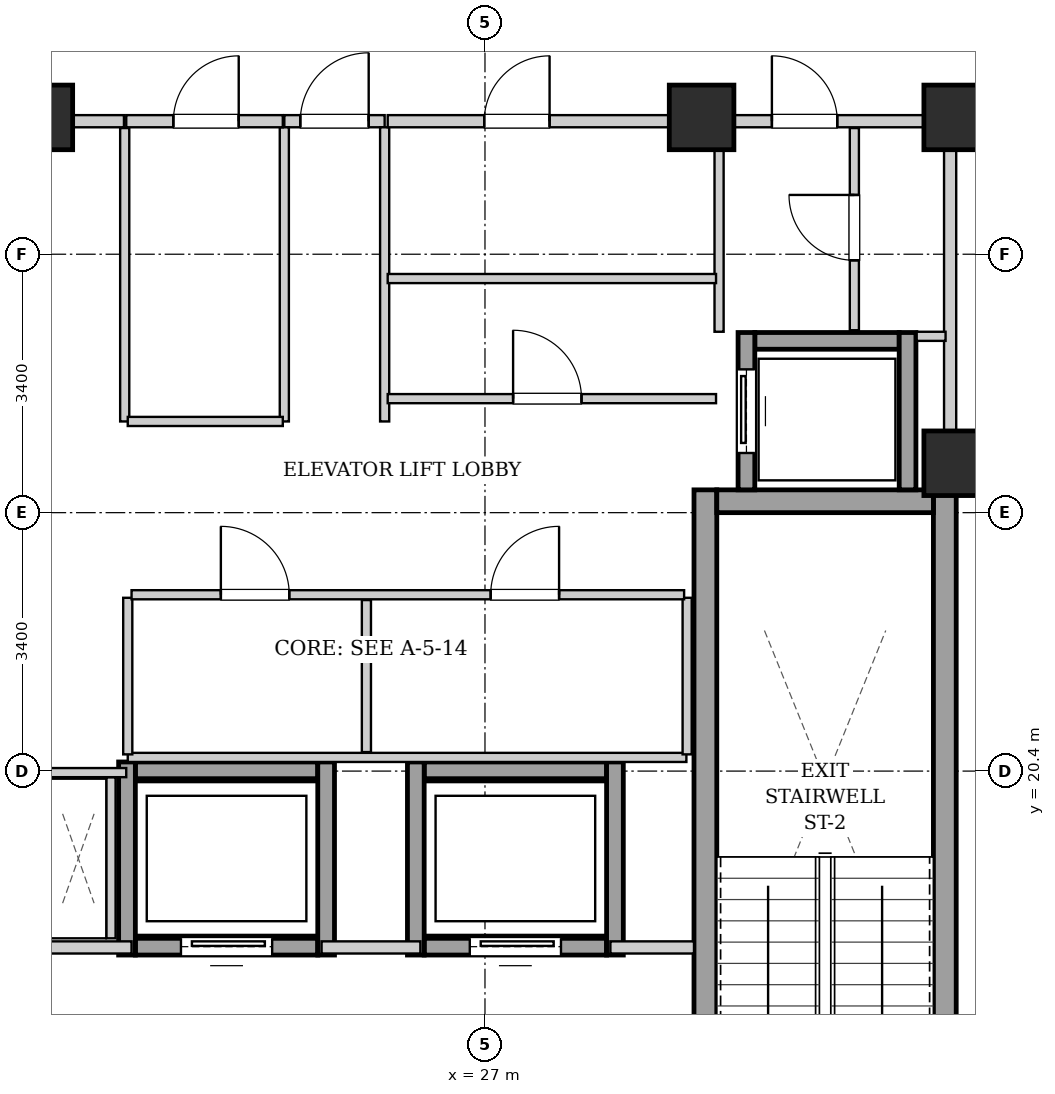
"""IFC4 building model, lengths in metres.
Left out: names, types, materials, properties, quantities, classifications, styles, units other than length and angle.
Written with IfcOpenShell. Run it as: python <this file> out.ifc"""

import sys

from ifc_helpers import new_model, si_unit, direction, frame, frame_2d, origin, origin_2d, place, context, subcontext, project, spatial, rectangle, extrude, element, fill, save


model = new_model("IFC4")
c1 = context("Model", 3, precision=1e-05, world=origin(), true_north=direction((0.0, 1.0)))
c2 = subcontext(c1, "Body", "Model", "MODEL_VIEW")
j1 = project(units=[si_unit("LENGTHUNIT", "METRE"), si_unit("PLANEANGLEUNIT", "RADIAN")], contexts=[c1])
p1 = place(None, origin())
s1 = spatial("IfcSite", under=j1, at=p1, CompositionType="ELEMENT")
p2 = place(p1, origin())
s2 = spatial("IfcBuilding", under=s1, at=p2, CompositionType="ELEMENT")
p3 = place(p2, frame((0.0, 0.0, 194.2)))
s3 = spatial("IfcBuildingStorey", under=s2, at=p3, CompositionType="ELEMENT", Elevation=194.2)
for number, where, z_axis, x_axis in (
    (1, (21.15, 29.0, 0.0), (0.0, 0.0, 1.0), (1.0, 0.0, 0.0)),
    (2, (29.85, 29.0, 0.0), (0.0, 0.0, 1.0), (1.0, 0.0, 0.0)),
    (3, (33.2, 29.0, 0.0), (0.0, 0.0, 1.0), (1.0, 0.0, 0.0)),
    (4, (33.2, 24.45, 0.0), (0.0, 0.0, 1.0), (1.0, 0.0, 0.0)),
):
    element("IfcColumn", number, at=place(p3, frame(where, z_axis=z_axis, x_axis=x_axis)), inside=s3, PredefinedType="COLUMN", context=c2, shape_type="SweptSolid", body=[
        extrude(rectangle(XDim=0.85, YDim=0.85, at=origin_2d()), origin(), (0.0, 0.0, 1.0), 3.3),
    ])
for number, where, z_axis, x_axis in (
    (5, (29.9, 15.1, 0.0), (0.0, 0.0, 1.0), (0.0, 1.0, 0.0)),
    (6, (33.05, 15.1, 0.0), (0.0, 0.0, 1.0), (0.0, 1.0, 0.0)),
):
    element("IfcWall", number, at=place(p3, frame(where, z_axis=z_axis, x_axis=x_axis)), inside=s3, PredefinedType="SHEAR", context=c2, shape_type="SweptSolid", body=[
        extrude(rectangle(XDim=9.0, YDim=0.3, at=frame_2d((4.5, 0.0))), origin(), (0.0, 0.0, 1.0), 3.04),
    ])
p4 = place(p3, frame((30.05, 23.95, 0.0), z_axis=(0.0, 0.0, 1.0), x_axis=(1.0, 0.0, 0.0)))
e7 = element("IfcWall", 7, at=p4, inside=s3, PredefinedType="SHEAR", context=c2, shape_type="SweptSolid", body=[
    extrude(rectangle(XDim=2.85, YDim=0.3, at=frame_2d((1.425, 0.0))), origin(), (0.0, 0.0, 1.0), 3.04),
])
p5 = place(p3, frame((30.55, 26.06, 0.0), z_axis=(0.0, 0.0, 1.0), x_axis=(1.0, 0.0, 0.0)))
e8 = element("IfcWall", 8, at=p5, inside=s3, PredefinedType="SHEAR", context=c2, shape_type="SweptSolid", body=[
    extrude(rectangle(XDim=1.9, YDim=0.22, at=frame_2d((0.95, 0.0))), origin(), (0.0, 0.0, 1.0), 3.04),
])
p6 = place(p3, frame((30.44, 24.1, 0.0), z_axis=(0.0, 0.0, 1.0), x_axis=(0.0, 1.0, 0.0)))
e9 = element("IfcWall", 9, at=p6, inside=s3, PredefinedType="SHEAR", context=c2, shape_type="SweptSolid", body=[
    extrude(rectangle(XDim=2.07, YDim=0.22, at=frame_2d((1.035, 0.0))), origin(), (0.0, 0.0, 1.0), 3.04),
])
p7 = place(p6, frame((0.485, 0.0, 0.0)))
e10 = element("IfcOpeningElement", 10, at=p7, cuts=e9, PredefinedType="OPENING", context=c2, shape_type="SweptSolid", body=[
    extrude(rectangle(XDim=1.1, YDim=2.15, at=frame_2d((0.55, 1.075))), frame((0.0, 0.12, 0.0), z_axis=(0.0, -1.0, 0.0), x_axis=(1.0, 0.0, 0.0)), (0.0, 0.0, 1.0), 0.24),
])
p8 = place(p3, frame((32.56, 24.1, 0.0), z_axis=(0.0, 0.0, 1.0), x_axis=(0.0, 1.0, 0.0)))
e11 = element("IfcWall", 11, at=p8, inside=s3, PredefinedType="SHEAR", context=c2, shape_type="SweptSolid", body=[
    extrude(rectangle(XDim=2.07, YDim=0.22, at=frame_2d((1.035, 0.0))), origin(), (0.0, 0.0, 1.0), 3.04),
])
p9 = place(p3, frame((22.4, 18.09, 0.0), z_axis=(0.0, 0.0, 1.0), x_axis=(1.0, 0.0, 0.0)))
e12 = element("IfcWall", 12, at=p9, inside=s3, PredefinedType="SHEAR", context=c2, shape_type="SweptSolid", body=[
    extrude(rectangle(XDim=2.4, YDim=0.22, at=frame_2d((1.2, 0.0))), origin(), (0.0, 0.0, 1.0), 3.04),
])
p10 = place(p9, frame((0.6, 0.0, 0.0)))
e13 = element("IfcOpeningElement", 13, at=p10, cuts=e12, PredefinedType="OPENING", context=c2, shape_type="SweptSolid", body=[
    extrude(rectangle(XDim=1.2, YDim=2.15, at=frame_2d((0.6, 1.075))), frame((0.0, 0.12, 0.0), z_axis=(0.0, -1.0, 0.0), x_axis=(1.0, 0.0, 0.0)), (0.0, 0.0, 1.0), 0.24),
])
p11 = place(p3, frame((22.4, 20.41, 0.0), z_axis=(0.0, 0.0, 1.0), x_axis=(1.0, 0.0, 0.0)))
e14 = element("IfcWall", 14, at=p11, inside=s3, PredefinedType="SHEAR", context=c2, shape_type="SweptSolid", body=[
    extrude(rectangle(XDim=2.4, YDim=0.22, at=frame_2d((1.2, 0.0))), origin(), (0.0, 0.0, 1.0), 3.04),
])
for number, where, z_axis, x_axis in (
    (15, (22.29, 17.98, 0.0), (0.0, 0.0, 1.0), (0.0, 1.0, 0.0)),
    (16, (24.91, 17.98, 0.0), (0.0, 0.0, 1.0), (0.0, 1.0, 0.0)),
):
    element("IfcWall", number, at=place(p3, frame(where, z_axis=z_axis, x_axis=x_axis)), inside=s3, PredefinedType="SHEAR", context=c2, shape_type="SweptSolid", body=[
        extrude(rectangle(XDim=2.54, YDim=0.22, at=frame_2d((1.27, 0.0))), origin(), (0.0, 0.0, 1.0), 3.04),
    ])
p12 = place(p3, frame((26.2, 18.09, 0.0), z_axis=(0.0, 0.0, 1.0), x_axis=(1.0, 0.0, 0.0)))
e17 = element("IfcWall", 17, at=p12, inside=s3, PredefinedType="SHEAR", context=c2, shape_type="SweptSolid", body=[
    extrude(rectangle(XDim=2.4, YDim=0.22, at=frame_2d((1.2, 0.0))), origin(), (0.0, 0.0, 1.0), 3.04),
])
p13 = place(p12, frame((0.6, 0.0, 0.0)))
e18 = element("IfcOpeningElement", 18, at=p13, cuts=e17, PredefinedType="OPENING", context=c2, shape_type="SweptSolid", body=[
    extrude(rectangle(XDim=1.2, YDim=2.15, at=frame_2d((0.6, 1.075))), frame((0.0, 0.12, 0.0), z_axis=(0.0, -1.0, 0.0), x_axis=(1.0, 0.0, 0.0)), (0.0, 0.0, 1.0), 0.24),
])
p14 = place(p3, frame((26.2, 20.41, 0.0), z_axis=(0.0, 0.0, 1.0), x_axis=(1.0, 0.0, 0.0)))
e19 = element("IfcWall", 19, at=p14, inside=s3, PredefinedType="SHEAR", context=c2, shape_type="SweptSolid", body=[
    extrude(rectangle(XDim=2.4, YDim=0.22, at=frame_2d((1.2, 0.0))), origin(), (0.0, 0.0, 1.0), 3.04),
])
for number, where, z_axis, x_axis in (
    (20, (26.09, 17.98, 0.0), (0.0, 0.0, 1.0), (0.0, 1.0, 0.0)),
    (21, (28.71, 17.98, 0.0), (0.0, 0.0, 1.0), (0.0, 1.0, 0.0)),
):
    element("IfcWall", number, at=place(p3, frame(where, z_axis=z_axis, x_axis=x_axis)), inside=s3, PredefinedType="SHEAR", context=c2, shape_type="SweptSolid", body=[
        extrude(rectangle(XDim=2.54, YDim=0.22, at=frame_2d((1.27, 0.0))), origin(), (0.0, 0.0, 1.0), 3.04),
    ])
p15 = place(p3, frame((21.25, 18.08, 0.0), z_axis=(0.0, 0.0, 1.0), x_axis=(1.0, 0.0, 0.0)))
e22 = element("IfcWall", 22, at=p15, inside=s3, PredefinedType="PARTITIONING", context=c2, shape_type="SweptSolid", body=[
    extrude(rectangle(XDim=1.1, YDim=0.16, at=frame_2d((0.55, 0.0))), origin(), (0.0, 0.0, 1.0), 3.04),
])
p16 = place(p3, frame((24.85, 18.08, 0.0), z_axis=(0.0, 0.0, 1.0), x_axis=(1.0, 0.0, 0.0)))
e23 = element("IfcWall", 23, at=p16, inside=s3, PredefinedType="PARTITIONING", context=c2, shape_type="SweptSolid", body=[
    extrude(rectangle(XDim=1.3, YDim=0.16, at=frame_2d((0.65, 0.0))), origin(), (0.0, 0.0, 1.0), 3.04),
])
p17 = place(p3, frame((28.65, 18.08, 0.0), z_axis=(0.0, 0.0, 1.0), x_axis=(1.0, 0.0, 0.0)))
e24 = element("IfcWall", 24, at=p17, inside=s3, PredefinedType="PARTITIONING", context=c2, shape_type="SweptSolid", body=[
    extrude(rectangle(XDim=1.1, YDim=0.16, at=frame_2d((0.55, 0.0))), origin(), (0.0, 0.0, 1.0), 3.04),
])
p18 = place(p3, frame((33.12, 24.12, 0.0), z_axis=(0.0, 0.0, 1.0), x_axis=(0.0, 1.0, 0.0)))
e25 = element("IfcWall", 25, at=p18, inside=s3, PredefinedType="PARTITIONING", context=c2, shape_type="SweptSolid", body=[
    extrude(rectangle(XDim=4.76, YDim=0.16, at=frame_2d((2.38, 0.0))), origin(), (0.0, 0.0, 1.0), 3.04),
])
p19 = place(p3, frame((24.36, 28.95, 0.0), z_axis=(0.0, 0.0, 1.0), x_axis=(1.0, 0.0, 0.0)))
e26 = element("IfcWall", 26, at=p19, inside=s3, PredefinedType="PARTITIONING", context=c2, shape_type="SweptSolid", body=[
    extrude(rectangle(XDim=1.32, YDim=0.16, at=frame_2d((0.66, 0.0))), origin(), (0.0, 0.0, 1.0), 2.556),
])
p20 = place(p19, frame((0.21, 0.0, 0.0)))
e27 = element("IfcOpeningElement", 27, at=p20, cuts=e26, PredefinedType="OPENING", context=c2, shape_type="SweptSolid", body=[
    extrude(rectangle(XDim=0.9, YDim=2.05, at=frame_2d((0.45, 1.025))), frame((0.0, 0.09, 0.0), z_axis=(0.0, -1.0, 0.0), x_axis=(1.0, 0.0, 0.0)), (0.0, 0.0, 1.0), 0.18),
])
p21 = place(p3, frame((17.96, 28.95, 0.0), z_axis=(0.0, 0.0, 1.0), x_axis=(1.0, 0.0, 0.0)))
e28 = element("IfcWall", 28, at=p21, inside=s3, PredefinedType="PARTITIONING", context=c2, shape_type="SweptSolid", body=[
    extrude(rectangle(XDim=4.29, YDim=0.16, at=frame_2d((2.145, 0.0))), origin(), (0.0, 0.0, 1.0), 2.556),
])
p22 = place(p21, frame((1.715, 0.0, 0.0)))
e29 = element("IfcOpeningElement", 29, at=p22, cuts=e28, PredefinedType="OPENING", context=c2, shape_type="SweptSolid", body=[
    extrude(rectangle(XDim=0.86, YDim=2.05, at=frame_2d((0.43, 1.025))), frame((0.0, 0.09, 0.0), z_axis=(0.0, -1.0, 0.0), x_axis=(1.0, 0.0, 0.0)), (0.0, 0.0, 1.0), 0.18),
])
p23 = place(p3, frame((22.08, 18.2, 0.0), z_axis=(0.0, 0.0, 1.0), x_axis=(0.0, 1.0, 0.0)))
e30 = element("IfcWall", 30, at=p23, inside=s3, PredefinedType="PARTITIONING", context=c2, shape_type="SweptSolid", body=[
    extrude(rectangle(XDim=2.12, YDim=0.12, at=frame_2d((1.06, 0.0))), origin(), (0.0, 0.0, 1.0), 3.04),
])
p24 = place(p3, frame((22.28, 20.38, 0.0), z_axis=(0.0, 0.0, 1.0), x_axis=(-1.0, 0.0, 0.0)))
e31 = element("IfcWall", 31, at=p24, inside=s3, PredefinedType="PARTITIONING", context=c2, shape_type="SweptSolid", body=[
    extrude(rectangle(XDim=1.02, YDim=0.12, at=frame_2d((0.51, 0.0))), origin(), (0.0, 0.0, 1.0), 3.04),
])
for number, where, z_axis, x_axis in (
    (32, (24.36, 25.0, 0.0), (0.0, 0.0, 1.0), (0.0, 1.0, 0.0)),
    (33, (25.68, 25.0, 0.0), (0.0, 0.0, 1.0), (0.0, 1.0, 0.0)),
):
    element("IfcWall", number, at=place(p3, frame(where, z_axis=z_axis, x_axis=x_axis)), inside=s3, PredefinedType="PARTITIONING", context=c2, shape_type="SweptSolid", body=[
        extrude(rectangle(XDim=3.87, YDim=0.12, at=frame_2d((1.935, 0.0))), origin(), (0.0, 0.0, 1.0), 3.04),
    ])
p25 = place(p3, frame((30.08, 26.18, 0.0), z_axis=(0.0, 0.0, 1.0), x_axis=(0.0, 1.0, 0.0)))
e34 = element("IfcWall", 34, at=p25, inside=s3, PredefinedType="PARTITIONING", context=c2, shape_type="SweptSolid", body=[
    extrude(rectangle(XDim=2.68, YDim=0.12, at=frame_2d((1.34, 0.0))), origin(), (0.0, 0.0, 1.0), 3.04),
])
p26 = place(p3, frame((32.68, 26.12, 0.0), z_axis=(0.0, 0.0, 1.0), x_axis=(1.0, 0.0, 0.0)))
e35 = element("IfcWall", 35, at=p26, inside=s3, PredefinedType="PARTITIONING", context=c2, shape_type="SweptSolid", body=[
    extrude(rectangle(XDim=0.38, YDim=0.12, at=frame_2d((0.19, 0.0))), origin(), (0.0, 0.0, 1.0), 3.04),
])
p27 = place(p3, frame((31.86, 26.2, 0.0), z_axis=(0.0, 0.0, 1.0), x_axis=(0.0, 1.0, 0.0)))
e36 = element("IfcWall", 36, at=p27, inside=s3, PredefinedType="PARTITIONING", context=c2, shape_type="SweptSolid", body=[
    extrude(rectangle(XDim=2.66, YDim=0.12, at=frame_2d((1.33, 0.0))), origin(), (0.0, 0.0, 1.0), 3.04),
])
p28 = place(p27, frame((0.92, 0.0, 0.0)))
e37 = element("IfcOpeningElement", 37, at=p28, cuts=e36, PredefinedType="OPENING", context=c2, shape_type="SweptSolid", body=[
    extrude(rectangle(XDim=0.86, YDim=2.05, at=frame_2d((0.43, 1.025))), frame((0.0, 0.07, 0.0), z_axis=(0.0, -1.0, 0.0), x_axis=(1.0, 0.0, 0.0)), (0.0, 0.0, 1.0), 0.14),
])
p29 = place(p3, frame((30.08, 28.95, 0.0), z_axis=(0.0, 0.0, 1.0), x_axis=(1.0, 0.0, 0.0)))
e38 = element("IfcWall", 38, at=p29, inside=s3, PredefinedType="PARTITIONING", context=c2, shape_type="SweptSolid", body=[
    extrude(rectangle(XDim=2.96, YDim=0.16, at=frame_2d((1.48, 0.0))), origin(), (0.0, 0.0, 1.0), 3.04),
])
p30 = place(p29, frame((0.695, 0.0, 0.0)))
e39 = element("IfcOpeningElement", 39, at=p30, cuts=e38, PredefinedType="OPENING", context=c2, shape_type="SweptSolid", body=[
    extrude(rectangle(XDim=0.86, YDim=2.05, at=frame_2d((0.43, 1.025))), frame((0.0, 0.09, 0.0), z_axis=(0.0, -1.0, 0.0), x_axis=(1.0, 0.0, 0.0)), (0.0, 0.0, 1.0), 0.18),
])
p31 = place(p3, frame((22.26, 25.0, 0.0), z_axis=(0.0, 0.0, 1.0), x_axis=(0.0, 1.0, 0.0)))
e40 = element("IfcWall", 40, at=p31, inside=s3, PredefinedType="PARTITIONING", context=c2, shape_type="SweptSolid", body=[
    extrude(rectangle(XDim=3.86, YDim=0.12, at=frame_2d((1.93, 0.0))), origin(), (0.0, 0.0, 1.0), 3.04),
])
p32 = place(p3, frame((22.3, 25.0, 0.0), z_axis=(0.0, 0.0, 1.0), x_axis=(1.0, 0.0, 0.0)))
e41 = element("IfcWall", 41, at=p32, inside=s3, PredefinedType="PARTITIONING", context=c2, shape_type="SweptSolid", body=[
    extrude(rectangle(XDim=2.04, YDim=0.12, at=frame_2d((1.02, 0.0))), origin(), (0.0, 0.0, 1.0), 3.04),
])
p33 = place(p3, frame((22.28, 28.95, 0.0), z_axis=(0.0, 0.0, 1.0), x_axis=(1.0, 0.0, 0.0)))
e42 = element("IfcWall", 42, at=p33, inside=s3, PredefinedType="PARTITIONING", context=c2, shape_type="SweptSolid", body=[
    extrude(rectangle(XDim=2.06, YDim=0.16, at=frame_2d((1.03, 0.0))), origin(), (0.0, 0.0, 1.0), 2.556),
])
p34 = place(p33, frame((0.62, 0.0, 0.0)))
e43 = element("IfcOpeningElement", 43, at=p34, cuts=e42, PredefinedType="OPENING", context=c2, shape_type="SweptSolid", body=[
    extrude(rectangle(XDim=0.86, YDim=2.05, at=frame_2d((0.43, 1.025))), frame((0.0, 0.09, 0.0), z_axis=(0.0, -1.0, 0.0), x_axis=(1.0, 0.0, 0.0)), (0.0, 0.0, 1.0), 0.18),
])
p35 = place(p3, frame((25.72, 26.88, 0.0), z_axis=(0.0, 0.0, 1.0), x_axis=(1.0, 0.0, 0.0)))
e44 = element("IfcWall", 44, at=p35, inside=s3, PredefinedType="PARTITIONING", context=c2, shape_type="SweptSolid", body=[
    extrude(rectangle(XDim=4.32, YDim=0.12, at=frame_2d((2.16, 0.0))), origin(), (0.0, 0.0, 1.0), 3.04),
])
p36 = place(p3, frame((25.72, 25.3, 0.0), z_axis=(0.0, 0.0, 1.0), x_axis=(1.0, 0.0, 0.0)))
e45 = element("IfcWall", 45, at=p36, inside=s3, PredefinedType="PARTITIONING", context=c2, shape_type="SweptSolid", body=[
    extrude(rectangle(XDim=4.32, YDim=0.12, at=frame_2d((2.16, 0.0))), origin(), (0.0, 0.0, 1.0), 3.04),
])
p37 = place(p36, frame((1.65, 0.0, 0.0)))
e46 = element("IfcOpeningElement", 46, at=p37, cuts=e45, PredefinedType="OPENING", context=c2, shape_type="SweptSolid", body=[
    extrude(rectangle(XDim=0.9, YDim=2.05, at=frame_2d((0.45, 1.025))), frame((0.0, 0.07, 0.0), z_axis=(0.0, -1.0, 0.0), x_axis=(1.0, 0.0, 0.0)), (0.0, 0.0, 1.0), 0.14),
])
p38 = place(p3, frame((25.72, 28.95, 0.0), z_axis=(0.0, 0.0, 1.0), x_axis=(1.0, 0.0, 0.0)))
e47 = element("IfcWall", 47, at=p38, inside=s3, PredefinedType="PARTITIONING", context=c2, shape_type="SweptSolid", body=[
    extrude(rectangle(XDim=4.32, YDim=0.16, at=frame_2d((2.16, 0.0))), origin(), (0.0, 0.0, 1.0), 2.556),
])
p39 = place(p38, frame((1.27, 0.0, 0.0)))
e48 = element("IfcOpeningElement", 48, at=p39, cuts=e47, PredefinedType="OPENING", context=c2, shape_type="SweptSolid", body=[
    extrude(rectangle(XDim=0.86, YDim=2.05, at=frame_2d((0.43, 1.025))), frame((0.0, 0.09, 0.0), z_axis=(0.0, -1.0, 0.0), x_axis=(1.0, 0.0, 0.0)), (0.0, 0.0, 1.0), 0.18),
])
p40 = place(p3, frame((22.3, 20.58, 0.0), z_axis=(0.0, 0.0, 1.0), x_axis=(1.0, 0.0, 0.0)))
e49 = element("IfcWall", 49, at=p40, inside=s3, PredefinedType="PARTITIONING", context=c2, shape_type="SweptSolid", body=[
    extrude(rectangle(XDim=7.35, YDim=0.12, at=frame_2d((3.675, 0.0))), origin(), (0.0, 0.0, 1.0), 3.04),
])
for number, where, z_axis, x_axis in (
    (50, (22.3, 20.62, 0.0), (0.0, 0.0, 1.0), (0.0, 1.0, 0.0)),
    (51, (29.66, 20.62, 0.0), (0.0, 0.0, 1.0), (0.0, 1.0, 0.0)),
):
    element("IfcWall", number, at=place(p3, frame(where, z_axis=z_axis, x_axis=x_axis)), inside=s3, PredefinedType="PARTITIONING", context=c2, shape_type="SweptSolid", body=[
        extrude(rectangle(XDim=2.06, YDim=0.12, at=frame_2d((1.03, 0.0))), origin(), (0.0, 0.0, 1.0), 3.04),
    ])
p41 = place(p3, frame((25.44, 20.65, 0.0), z_axis=(0.0, 0.0, 1.0), x_axis=(0.0, 1.0, 0.0)))
e52 = element("IfcWall", 52, at=p41, inside=s3, PredefinedType="PARTITIONING", context=c2, shape_type="SweptSolid", body=[
    extrude(rectangle(XDim=2.0, YDim=0.12, at=frame_2d((1.0, 0.0))), origin(), (0.0, 0.0, 1.0), 3.04),
])
p42 = place(p3, frame((22.35, 22.72, 0.0), z_axis=(0.0, 0.0, 1.0), x_axis=(1.0, 0.0, 0.0)))
e53 = element("IfcWall", 53, at=p42, inside=s3, PredefinedType="PARTITIONING", context=c2, shape_type="SweptSolid", body=[
    extrude(rectangle(XDim=7.27, YDim=0.12, at=frame_2d((3.635, 0.0))), origin(), (0.0, 0.0, 1.0), 3.04),
])
p43 = place(p42, frame((1.175, 0.0, 0.0)))
e54 = element("IfcOpeningElement", 54, at=p43, cuts=e53, PredefinedType="OPENING", context=c2, shape_type="SweptSolid", body=[
    extrude(rectangle(XDim=0.9, YDim=2.05, at=frame_2d((0.45, 1.025))), frame((0.0, 0.07, 0.0), z_axis=(0.0, -1.0, 0.0), x_axis=(1.0, 0.0, 0.0)), (0.0, 0.0, 1.0), 0.14),
])
p44 = place(p42, frame((4.725, 0.0, 0.0)))
e55 = element("IfcOpeningElement", 55, at=p44, cuts=e53, PredefinedType="OPENING", context=c2, shape_type="SweptSolid", body=[
    extrude(rectangle(XDim=0.9, YDim=2.05, at=frame_2d((0.45, 1.025))), frame((0.0, 0.07, 0.0), z_axis=(0.0, -1.0, 0.0), x_axis=(1.0, 0.0, 0.0)), (0.0, 0.0, 1.0), 0.14),
])
p45 = place(p7, origin())
e56 = element("IfcDoor", 56, at=p45, inside=s3, OperationType="SLIDING_TO_LEFT", PredefinedType="DOOR", context=c2, shape_type="SweptSolid", body=[
    extrude(rectangle(XDim=1.1, YDim=2.15, at=frame_2d((0.55, 1.075))), frame((0.0, 0.025, 0.0), z_axis=(0.0, -1.0, 0.0), x_axis=(1.0, 0.0, 0.0)), (0.0, 0.0, 1.0), 0.05),
])
fill(e10, e56)
p46 = place(p10, origin())
e57 = element("IfcDoor", 57, at=p46, inside=s3, OperationType="SLIDING_TO_LEFT", PredefinedType="DOOR", context=c2, shape_type="SweptSolid", body=[
    extrude(rectangle(XDim=1.2, YDim=2.15, at=frame_2d((0.6, 1.075))), frame((0.0, 0.025, 0.0), z_axis=(0.0, -1.0, 0.0), x_axis=(1.0, 0.0, 0.0)), (0.0, 0.0, 1.0), 0.05),
])
fill(e13, e57)
p47 = place(p13, origin())
e58 = element("IfcDoor", 58, at=p47, inside=s3, OperationType="SLIDING_TO_LEFT", PredefinedType="DOOR", context=c2, shape_type="SweptSolid", body=[
    extrude(rectangle(XDim=1.2, YDim=2.15, at=frame_2d((0.6, 1.075))), frame((0.0, 0.025, 0.0), z_axis=(0.0, -1.0, 0.0), x_axis=(1.0, 0.0, 0.0)), (0.0, 0.0, 1.0), 0.05),
])
fill(e18, e58)
p48 = place(p20, origin())
e59 = element("IfcDoor", 59, at=p48, inside=s3, OperationType="SINGLE_SWING_RIGHT", PredefinedType="DOOR", context=c2, shape_type="SweptSolid", body=[
    extrude(rectangle(XDim=0.9, YDim=2.05, at=frame_2d((0.45, 1.025))), frame((0.0, 0.025, 0.0), z_axis=(0.0, -1.0, 0.0), x_axis=(1.0, 0.0, 0.0)), (0.0, 0.0, 1.0), 0.05),
])
fill(e27, e59)
p49 = place(p28, origin())
e60 = element("IfcDoor", 60, at=p49, inside=s3, OperationType="SINGLE_SWING_RIGHT", PredefinedType="DOOR", context=c2, shape_type="SweptSolid", body=[
    extrude(rectangle(XDim=0.86, YDim=2.05, at=frame_2d((0.43, 1.025))), frame((0.0, 0.025, 0.0), z_axis=(0.0, -1.0, 0.0), x_axis=(1.0, 0.0, 0.0)), (0.0, 0.0, 1.0), 0.05),
])
fill(e37, e60)
p50 = place(p30, origin())
e61 = element("IfcDoor", 61, at=p50, inside=s3, OperationType="SINGLE_SWING_LEFT", PredefinedType="DOOR", context=c2, shape_type="SweptSolid", body=[
    extrude(rectangle(XDim=0.86, YDim=2.05, at=frame_2d((0.43, 1.025))), frame((0.0, 0.025, 0.0), z_axis=(0.0, -1.0, 0.0), x_axis=(1.0, 0.0, 0.0)), (0.0, 0.0, 1.0), 0.05),
])
fill(e39, e61)
p51 = place(p34, origin())
e62 = element("IfcDoor", 62, at=p51, inside=s3, OperationType="SINGLE_SWING_RIGHT", PredefinedType="DOOR", context=c2, shape_type="SweptSolid", body=[
    extrude(rectangle(XDim=0.86, YDim=2.05, at=frame_2d((0.43, 1.025))), frame((0.0, 0.025, 0.0), z_axis=(0.0, -1.0, 0.0), x_axis=(1.0, 0.0, 0.0)), (0.0, 0.0, 1.0), 0.05),
])
fill(e43, e62)
p52 = place(p37, origin())
e63 = element("IfcDoor", 63, at=p52, inside=s3, OperationType="SINGLE_SWING_LEFT", PredefinedType="DOOR", context=c2, shape_type="SweptSolid", body=[
    extrude(rectangle(XDim=0.9, YDim=2.05, at=frame_2d((0.45, 1.025))), frame((0.0, 0.025, 0.0), z_axis=(0.0, -1.0, 0.0), x_axis=(1.0, 0.0, 0.0)), (0.0, 0.0, 1.0), 0.05),
])
fill(e46, e63)
p53 = place(p39, origin())
e64 = element("IfcDoor", 64, at=p53, inside=s3, OperationType="SINGLE_SWING_RIGHT", PredefinedType="DOOR", context=c2, shape_type="SweptSolid", body=[
    extrude(rectangle(XDim=0.86, YDim=2.05, at=frame_2d((0.43, 1.025))), frame((0.0, 0.025, 0.0), z_axis=(0.0, -1.0, 0.0), x_axis=(1.0, 0.0, 0.0)), (0.0, 0.0, 1.0), 0.05),
])
fill(e48, e64)
p54 = place(p43, origin())
e65 = element("IfcDoor", 65, at=p54, inside=s3, OperationType="SINGLE_SWING_LEFT", PredefinedType="DOOR", context=c2, shape_type="SweptSolid", body=[
    extrude(rectangle(XDim=0.9, YDim=2.05, at=frame_2d((0.45, 1.025))), frame((0.0, 0.025, 0.0), z_axis=(0.0, -1.0, 0.0), x_axis=(1.0, 0.0, 0.0)), (0.0, 0.0, 1.0), 0.05),
])
fill(e54, e65)
p55 = place(p44, origin())
e66 = element("IfcDoor", 66, at=p55, inside=s3, OperationType="SINGLE_SWING_RIGHT", PredefinedType="DOOR", context=c2, shape_type="SweptSolid", body=[
    extrude(rectangle(XDim=0.9, YDim=2.05, at=frame_2d((0.45, 1.025))), frame((0.0, 0.025, 0.0), z_axis=(0.0, -1.0, 0.0), x_axis=(1.0, 0.0, 0.0)), (0.0, 0.0, 1.0), 0.05),
])
fill(e55, e66)
save(model, sys.argv[1])
